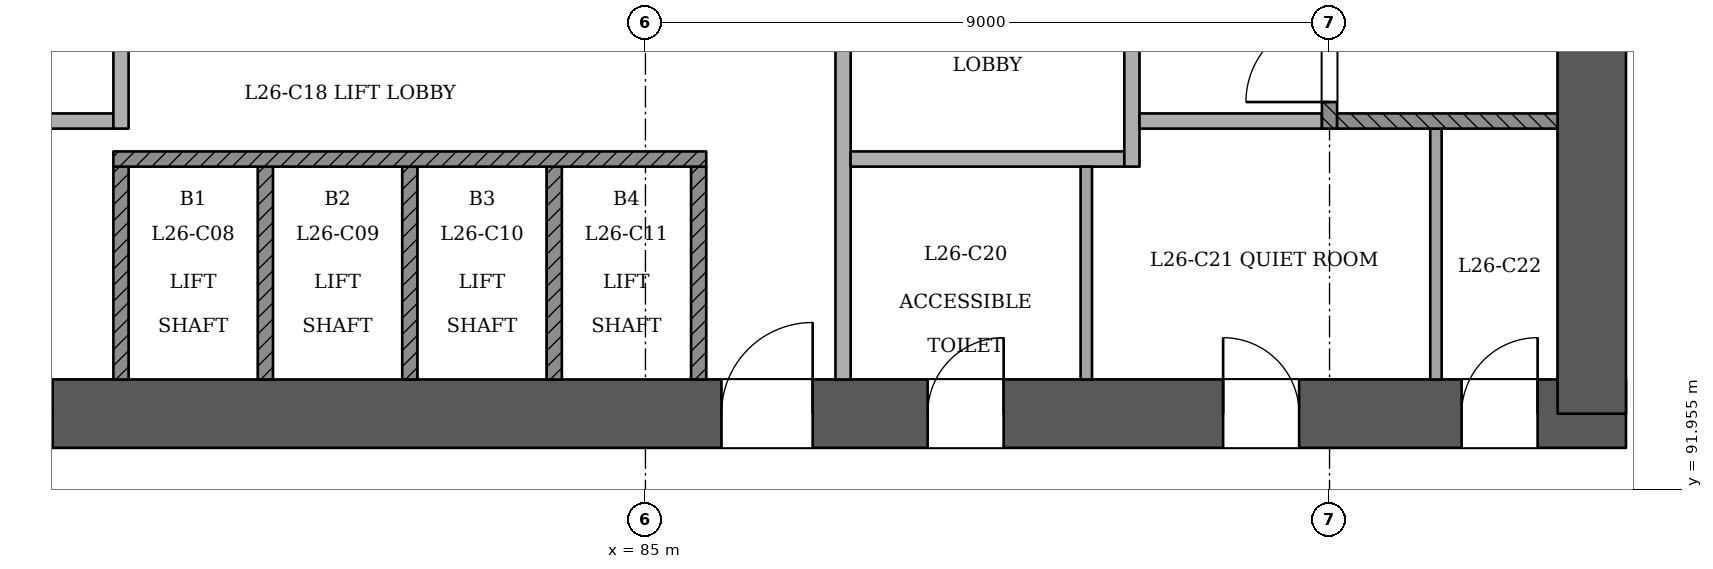
"""IFC4 building model, lengths in metres.
Left out: names, types, materials, properties, quantities, classifications, styles, units other than length and angle.
Written with IfcOpenShell. Run it as: python <this file> out.ifc"""

import sys

from ifc_helpers import new_model, si_unit, direction, frame, frame_2d, origin, place, context, subcontext, project, spatial, rectangle, extrude, element, fill, save


model = new_model("IFC4")
c1 = context("Model", 3, precision=1e-05, world=origin(), true_north=direction((0.0, 1.0)))
c2 = subcontext(c1, "Body", "Model", "MODEL_VIEW")
j1 = project(units=[si_unit("LENGTHUNIT", "METRE"), si_unit("PLANEANGLEUNIT", "RADIAN")], contexts=[c1])
p1 = place(None, origin())
s1 = spatial("IfcSite", under=j1, at=p1, CompositionType="ELEMENT")
p2 = place(p1, origin())
s2 = spatial("IfcBuilding", under=s1, at=p2, CompositionType="ELEMENT")
p3 = place(p2, frame((0.0, 0.0, 104.4)))
s3 = spatial("IfcBuildingStorey", under=s2, at=p3, CompositionType="ELEMENT", Elevation=104.4)
p4 = place(p3, frame((72.55, 92.95, 0.0), z_axis=(0.0, 0.0, 1.0), x_axis=(1.0, 0.0, 0.0)))
e1 = element("IfcWall", 1, at=p4, inside=s3, PredefinedType="SHEAR", context=c2, shape_type="SweptSolid", body=[
    extrude(rectangle(XDim=25.35, YDim=0.9, at=frame_2d((12.675, 0.0))), origin(), (0.0, 0.0, 1.0), 3.6),
])
p5 = place(p4, frame((1.25, 0.0, 0.0)))
e2 = element("IfcOpeningElement", 2, at=p5, cuts=e1, PredefinedType="OPENING", context=c2, shape_type="SweptSolid", body=[
    extrude(rectangle(XDim=1.2, YDim=2.1, at=frame_2d((0.6, 1.05))), frame((0.0, 0.46, 0.0), z_axis=(0.0, -1.0, 0.0), x_axis=(1.0, 0.0, 0.0)), (0.0, 0.0, 1.0), 0.921),
])
p6 = place(p4, frame((3.45, 0.0, 0.0)))
e3 = element("IfcOpeningElement", 3, at=p6, cuts=e1, PredefinedType="OPENING", context=c2, shape_type="SweptSolid", body=[
    extrude(rectangle(XDim=1.2, YDim=2.1, at=frame_2d((0.6, 1.05))), frame((0.0, 0.46, 0.0), z_axis=(0.0, -1.0, 0.0), x_axis=(1.0, 0.0, 0.0)), (0.0, 0.0, 1.0), 0.921),
])
p7 = place(p4, frame((13.45, 0.0, 0.0)))
e4 = element("IfcOpeningElement", 4, at=p7, cuts=e1, PredefinedType="OPENING", context=c2, shape_type="SweptSolid", body=[
    extrude(rectangle(XDim=1.2, YDim=2.1, at=frame_2d((0.6, 1.05))), frame((0.0, 0.46, 0.0), z_axis=(0.0, -1.0, 0.0), x_axis=(1.0, 0.0, 0.0)), (0.0, 0.0, 1.0), 0.921),
])
p8 = place(p4, frame((16.163, 0.0, 0.0)))
e5 = element("IfcOpeningElement", 5, at=p8, cuts=e1, PredefinedType="OPENING", context=c2, shape_type="SweptSolid", body=[
    extrude(rectangle(XDim=1.0, YDim=2.1, at=frame_2d((0.5, 1.05))), frame((0.0, 0.46, 0.0), z_axis=(0.0, -1.0, 0.0), x_axis=(1.0, 0.0, 0.0)), (0.0, 0.0, 1.0), 0.921),
])
p9 = place(p4, frame((20.05, 0.0, 0.0)))
e6 = element("IfcOpeningElement", 6, at=p9, cuts=e1, PredefinedType="OPENING", context=c2, shape_type="SweptSolid", body=[
    extrude(rectangle(XDim=1.0, YDim=2.1, at=frame_2d((0.5, 1.05))), frame((0.0, 0.46, 0.0), z_axis=(0.0, -1.0, 0.0), x_axis=(1.0, 0.0, 0.0)), (0.0, 0.0, 1.0), 0.921),
])
p10 = place(p4, frame((23.188, 0.0, 0.0)))
e7 = element("IfcOpeningElement", 7, at=p10, cuts=e1, PredefinedType="OPENING", context=c2, shape_type="SweptSolid", body=[
    extrude(rectangle(XDim=1.0, YDim=2.1, at=frame_2d((0.5, 1.05))), frame((0.0, 0.46, 0.0), z_axis=(0.0, -1.0, 0.0), x_axis=(1.0, 0.0, 0.0)), (0.0, 0.0, 1.0), 0.921),
])
p11 = place(p3, frame((97.45, 92.95, 0.0), z_axis=(0.0, 0.0, 1.0), x_axis=(0.0, 1.0, 0.0)))
e8 = element("IfcWall", 8, at=p11, inside=s3, PredefinedType="SHEAR", context=c2, shape_type="SweptSolid", body=[
    extrude(rectangle(XDim=11.35, YDim=0.9, at=frame_2d((5.675, 0.0))), origin(), (0.0, 0.0, 1.0), 3.6),
])
p12 = place(p3, frame((63.745, 97.773, 0.0), z_axis=(0.0, 0.0, 1.0), x_axis=(0.500001045382, -0.866024800232, 0.0)))
e9 = element("IfcWall", 9, at=p12, inside=s3, PredefinedType="PARTITIONING", context=c2, shape_type="SweptSolid", body=[
    extrude(rectangle(XDim=41.671, YDim=0.15, at=frame_2d((20.836, 0.0))), origin(), (0.0, 0.0, 1.0), 2.7),
])
p13 = place(p12, frame((2.868, 0.0, 0.0)))
e10 = element("IfcOpeningElement", 10, at=p13, cuts=e9, PredefinedType="OPENING", context=c2, shape_type="SweptSolid", body=[
    extrude(rectangle(XDim=1.2, YDim=2.1, at=frame_2d((0.6, 1.05))), frame((0.0, 0.085, 0.0), z_axis=(0.0, -1.0, 0.0), x_axis=(1.0, 0.0, 0.0)), (0.0, 0.0, 1.0), 0.171),
])
p14 = place(p12, frame((10.115, 0.0, 0.0)))
e11 = element("IfcOpeningElement", 11, at=p14, cuts=e9, PredefinedType="OPENING", context=c2, shape_type="SweptSolid", body=[
    extrude(rectangle(XDim=1.0, YDim=2.1, at=frame_2d((0.5, 1.05))), frame((0.0, 0.085, 0.0), z_axis=(0.0, -1.0, 0.0), x_axis=(1.0, 0.0, 0.0)), (0.0, 0.0, 1.0), 0.171),
])
p15 = place(p12, frame((12.44, 0.0, 0.0)))
e12 = element("IfcOpeningElement", 12, at=p15, cuts=e9, PredefinedType="OPENING", context=c2, shape_type="SweptSolid", body=[
    extrude(rectangle(XDim=1.0, YDim=2.1, at=frame_2d((0.5, 1.05))), frame((0.0, 0.085, 0.0), z_axis=(0.0, -1.0, 0.0), x_axis=(1.0, 0.0, 0.0)), (0.0, 0.0, 1.0), 0.171),
])
p16 = place(p12, frame((19.231, 0.0, 0.0)))
e13 = element("IfcOpeningElement", 13, at=p16, cuts=e9, PredefinedType="OPENING", context=c2, shape_type="SweptSolid", body=[
    extrude(rectangle(XDim=1.0, YDim=2.1, at=frame_2d((0.5, 1.05))), frame((0.0, 0.085, 0.0), z_axis=(0.0, -1.0, 0.0), x_axis=(1.0, 0.0, 0.0)), (0.0, 0.0, 1.0), 0.171),
])
p17 = place(p12, frame((21.556, 0.0, 0.0)))
e14 = element("IfcOpeningElement", 14, at=p17, cuts=e9, PredefinedType="OPENING", context=c2, shape_type="SweptSolid", body=[
    extrude(rectangle(XDim=1.0, YDim=2.1, at=frame_2d((0.5, 1.05))), frame((0.0, 0.085, 0.0), z_axis=(0.0, -1.0, 0.0), x_axis=(1.0, 0.0, 0.0)), (0.0, 0.0, 1.0), 0.171),
])
p18 = place(p12, frame((27.086, 0.0, 0.0)))
e15 = element("IfcOpeningElement", 15, at=p18, cuts=e9, PredefinedType="OPENING", context=c2, shape_type="SweptSolid", body=[
    extrude(rectangle(XDim=1.0, YDim=2.1, at=frame_2d((0.5, 1.05))), frame((0.0, 0.085, 0.0), z_axis=(0.0, -1.0, 0.0), x_axis=(1.0, 0.0, 0.0)), (0.0, 0.0, 1.0), 0.171),
])
p19 = place(p12, frame((30.44, 0.0, 0.0)))
e16 = element("IfcOpeningElement", 16, at=p19, cuts=e9, PredefinedType="OPENING", context=c2, shape_type="SweptSolid", body=[
    extrude(rectangle(XDim=1.0, YDim=2.1, at=frame_2d((0.5, 1.05))), frame((0.0, 0.085, 0.0), z_axis=(0.0, -1.0, 0.0), x_axis=(1.0, 0.0, 0.0)), (0.0, 0.0, 1.0), 0.171),
])
p20 = place(p12, frame((37.619, 0.0, 0.0)))
e17 = element("IfcOpeningElement", 17, at=p20, cuts=e9, PredefinedType="OPENING", context=c2, shape_type="SweptSolid", body=[
    extrude(rectangle(XDim=1.2, YDim=2.1, at=frame_2d((0.6, 1.05))), frame((0.0, 0.085, 0.0), z_axis=(0.0, -1.0, 0.0), x_axis=(1.0, 0.0, 0.0)), (0.0, 0.0, 1.0), 0.171),
])
p21 = place(p3, frame((85.42, 61.685, 0.0), z_axis=(0.0, 0.0, 1.0), x_axis=(0.500001045382, 0.866024800232, 0.0)))
e18 = element("IfcWall", 18, at=p21, inside=s3, PredefinedType="PARTITIONING", context=c2, shape_type="SweptSolid", body=[
    extrude(rectangle(XDim=41.671, YDim=0.15, at=frame_2d((20.836, 0.0))), origin(), (0.0, 0.0, 1.0), 2.7),
])
p22 = place(p21, frame((0.239, 0.0, 0.0)))
e19 = element("IfcOpeningElement", 19, at=p22, cuts=e18, PredefinedType="OPENING", context=c2, shape_type="SweptSolid", body=[
    extrude(rectangle(XDim=1.2, YDim=2.1, at=frame_2d((0.6, 1.05))), frame((0.0, 0.085, 0.0), z_axis=(0.0, -1.0, 0.0), x_axis=(1.0, 0.0, 0.0)), (0.0, 0.0, 1.0), 0.171),
])
p23 = place(p21, frame((5.636, 0.0, 0.0)))
e20 = element("IfcOpeningElement", 20, at=p23, cuts=e18, PredefinedType="OPENING", context=c2, shape_type="SweptSolid", body=[
    extrude(rectangle(XDim=1.2, YDim=2.1, at=frame_2d((0.6, 1.05))), frame((0.0, 0.085, 0.0), z_axis=(0.0, -1.0, 0.0), x_axis=(1.0, 0.0, 0.0)), (0.0, 0.0, 1.0), 0.171),
])
p24 = place(p21, frame((13.586, 0.0, 0.0)))
e21 = element("IfcOpeningElement", 21, at=p24, cuts=e18, PredefinedType="OPENING", context=c2, shape_type="SweptSolid", body=[
    extrude(rectangle(XDim=1.0, YDim=2.1, at=frame_2d((0.5, 1.05))), frame((0.0, 0.085, 0.0), z_axis=(0.0, -1.0, 0.0), x_axis=(1.0, 0.0, 0.0)), (0.0, 0.0, 1.0), 0.171),
])
p25 = place(p21, frame((18.086, 0.0, 0.0)))
e22 = element("IfcOpeningElement", 22, at=p25, cuts=e18, PredefinedType="OPENING", context=c2, shape_type="SweptSolid", body=[
    extrude(rectangle(XDim=1.0, YDim=2.1, at=frame_2d((0.5, 1.05))), frame((0.0, 0.085, 0.0), z_axis=(0.0, -1.0, 0.0), x_axis=(1.0, 0.0, 0.0)), (0.0, 0.0, 1.0), 0.171),
])
p26 = place(p21, frame((21.556, 0.0, 0.0)))
e23 = element("IfcOpeningElement", 23, at=p26, cuts=e18, PredefinedType="OPENING", context=c2, shape_type="SweptSolid", body=[
    extrude(rectangle(XDim=1.0, YDim=2.1, at=frame_2d((0.5, 1.05))), frame((0.0, 0.085, 0.0), z_axis=(0.0, -1.0, 0.0), x_axis=(1.0, 0.0, 0.0)), (0.0, 0.0, 1.0), 0.171),
])
p27 = place(p21, frame((27.086, 0.0, 0.0)))
e24 = element("IfcOpeningElement", 24, at=p27, cuts=e18, PredefinedType="OPENING", context=c2, shape_type="SweptSolid", body=[
    extrude(rectangle(XDim=1.0, YDim=2.1, at=frame_2d((0.5, 1.05))), frame((0.0, 0.085, 0.0), z_axis=(0.0, -1.0, 0.0), x_axis=(1.0, 0.0, 0.0)), (0.0, 0.0, 1.0), 0.171),
])
p28 = place(p21, frame((30.556, 0.0, 0.0)))
e25 = element("IfcOpeningElement", 25, at=p28, cuts=e18, PredefinedType="OPENING", context=c2, shape_type="SweptSolid", body=[
    extrude(rectangle(XDim=1.0, YDim=2.1, at=frame_2d((0.5, 1.05))), frame((0.0, 0.085, 0.0), z_axis=(0.0, -1.0, 0.0), x_axis=(1.0, 0.0, 0.0)), (0.0, 0.0, 1.0), 0.171),
])
p29 = place(p21, frame((37.604, 0.0, 0.0)))
e26 = element("IfcOpeningElement", 26, at=p29, cuts=e18, PredefinedType="OPENING", context=c2, shape_type="SweptSolid", body=[
    extrude(rectangle(XDim=1.2, YDim=2.1, at=frame_2d((0.6, 1.05))), frame((0.0, 0.085, 0.0), z_axis=(0.0, -1.0, 0.0), x_axis=(1.0, 0.0, 0.0)), (0.0, 0.0, 1.0), 0.171),
])
for number, where, z_axis, x_axis in (
    (27, (78.1, 93.4, 0.0), (0.0, 0.0, 1.0), (0.0, 1.0, 0.0)),
    (28, (80.0, 93.4, 0.0), (0.0, 0.0, 1.0), (0.0, 1.0, 0.0)),
    (29, (81.9, 93.4, 0.0), (0.0, 0.0, 1.0), (0.0, 1.0, 0.0)),
    (30, (83.8, 93.4, 0.0), (0.0, 0.0, 1.0), (0.0, 1.0, 0.0)),
    (31, (85.7, 93.4, 0.0), (0.0, 0.0, 1.0), (0.0, 1.0, 0.0)),
):
    element("IfcWall", number, at=place(p3, frame(where, z_axis=z_axis, x_axis=x_axis)), inside=s3, PredefinedType="SOLIDWALL", context=c2, shape_type="SweptSolid", body=[
        extrude(rectangle(XDim=2.8, YDim=0.2, at=frame_2d((1.4, 0.0))), origin(), (0.0, 0.0, 1.0), 3.1),
    ])
p30 = place(p3, frame((87.6, 93.4, 0.0), z_axis=(0.0, 0.0, 1.0), x_axis=(0.0, 1.0, 0.0)))
e32 = element("IfcWall", 32, at=p30, inside=s3, PredefinedType="PARTITIONING", context=c2, shape_type="SweptSolid", body=[
    extrude(rectangle(XDim=7.0, YDim=0.2, at=frame_2d((3.5, 0.0))), origin(), (0.0, 0.0, 1.0), 3.1),
])
p31 = place(p30, frame((4.45, 0.0, 0.0)))
e33 = element("IfcOpeningElement", 33, at=p31, cuts=e32, PredefinedType="OPENING", context=c2, shape_type="SweptSolid", body=[
    extrude(rectangle(XDim=1.1, YDim=2.1, at=frame_2d((0.55, 1.05))), frame((0.0, 0.11, 0.0), z_axis=(0.0, -1.0, 0.0), x_axis=(1.0, 0.0, 0.0)), (0.0, 0.0, 1.0), 0.221),
])
p32 = place(p3, frame((90.8, 93.4, 0.0), z_axis=(0.0, 0.0, 1.0), x_axis=(0.0, 1.0, 0.0)))
e34 = element("IfcWall", 34, at=p32, inside=s3, PredefinedType="PARTITIONING", context=c2, shape_type="SweptSolid", body=[
    extrude(rectangle(XDim=2.8, YDim=0.15, at=frame_2d((1.4, 0.0))), origin(), (0.0, 0.0, 1.0), 3.1),
])
p33 = place(p3, frame((95.4, 93.4, 0.0), z_axis=(0.0, 0.0, 1.0), x_axis=(0.0, 1.0, 0.0)))
e35 = element("IfcWall", 35, at=p33, inside=s3, PredefinedType="PARTITIONING", context=c2, shape_type="SweptSolid", body=[
    extrude(rectangle(XDim=3.3, YDim=0.15, at=frame_2d((1.65, 0.0))), origin(), (0.0, 0.0, 1.0), 3.1),
])
p34 = place(p3, frame((78.0, 96.3, 0.0), z_axis=(0.0, 0.0, 1.0), x_axis=(1.0, 0.0, 0.0)))
e36 = element("IfcWall", 36, at=p34, inside=s3, PredefinedType="SOLIDWALL", context=c2, shape_type="SweptSolid", body=[
    extrude(rectangle(XDim=7.8, YDim=0.2, at=frame_2d((3.9, 0.0))), origin(), (0.0, 0.0, 1.0), 3.1),
])
p35 = place(p3, frame((87.7, 96.3, 0.0), z_axis=(0.0, 0.0, 1.0), x_axis=(1.0, 0.0, 0.0)))
e37 = element("IfcWall", 37, at=p35, inside=s3, PredefinedType="PARTITIONING", context=c2, shape_type="SweptSolid", body=[
    extrude(rectangle(XDim=3.6, YDim=0.2, at=frame_2d((1.8, 0.0))), origin(), (0.0, 0.0, 1.0), 3.1),
])
p36 = place(p3, frame((91.4, 96.2, 0.0), z_axis=(0.0, 0.0, 1.0), x_axis=(0.0, 1.0, 0.0)))
e38 = element("IfcWall", 38, at=p36, inside=s3, PredefinedType="PARTITIONING", context=c2, shape_type="SweptSolid", body=[
    extrude(rectangle(XDim=4.2, YDim=0.2, at=frame_2d((2.1, 0.0))), origin(), (0.0, 0.0, 1.0), 3.1),
])
p37 = place(p36, frame((2.45, 0.0, 0.0)))
e39 = element("IfcOpeningElement", 39, at=p37, cuts=e38, PredefinedType="OPENING", context=c2, shape_type="SweptSolid", body=[
    extrude(rectangle(XDim=1.1, YDim=2.1, at=frame_2d((0.55, 1.05))), frame((0.0, 0.11, 0.0), z_axis=(0.0, -1.0, 0.0), x_axis=(1.0, 0.0, 0.0)), (0.0, 0.0, 1.0), 0.221),
])
p38 = place(p3, frame((76.1, 96.8, 0.0), z_axis=(0.0, 0.0, 1.0), x_axis=(1.0, 0.0, 0.0)))
e40 = element("IfcWall", 40, at=p38, inside=s3, PredefinedType="PARTITIONING", context=c2, shape_type="SweptSolid", body=[
    extrude(rectangle(XDim=1.9, YDim=0.2, at=frame_2d((0.95, 0.0))), origin(), (0.0, 0.0, 1.0), 3.1),
])
p39 = place(p3, frame((78.1, 96.7, 0.0), z_axis=(0.0, 0.0, 1.0), x_axis=(0.0, 1.0, 0.0)))
e41 = element("IfcWall", 41, at=p39, inside=s3, PredefinedType="PARTITIONING", context=c2, shape_type="SweptSolid", body=[
    extrude(rectangle(XDim=3.7, YDim=0.2, at=frame_2d((1.85, 0.0))), origin(), (0.0, 0.0, 1.0), 3.1),
])
p40 = place(p39, frame((1.95, 0.0, 0.0)))
e42 = element("IfcOpeningElement", 42, at=p40, cuts=e41, PredefinedType="OPENING", context=c2, shape_type="SweptSolid", body=[
    extrude(rectangle(XDim=1.1, YDim=2.1, at=frame_2d((0.55, 1.05))), frame((0.0, 0.11, 0.0), z_axis=(0.0, -1.0, 0.0), x_axis=(1.0, 0.0, 0.0)), (0.0, 0.0, 1.0), 0.221),
])
p41 = place(p3, frame((91.5, 96.8, 0.0), z_axis=(0.0, 0.0, 1.0), x_axis=(1.0, 0.0, 0.0)))
e43 = element("IfcWall", 43, at=p41, inside=s3, PredefinedType="PARTITIONING", context=c2, shape_type="SweptSolid", body=[
    extrude(rectangle(XDim=2.4, YDim=0.2, at=frame_2d((1.2, 0.0))), origin(), (0.0, 0.0, 1.0), 3.1),
])
p42 = place(p3, frame((94.0, 96.7, 0.0), z_axis=(0.0, 0.0, 1.0), x_axis=(0.0, 1.0, 0.0)))
e44 = element("IfcWall", 44, at=p42, inside=s3, PredefinedType="SOLIDWALL", context=c2, shape_type="SweptSolid", body=[
    extrude(rectangle(XDim=3.7, YDim=0.2, at=frame_2d((1.85, 0.0))), origin(), (0.0, 0.0, 1.0), 3.1),
])
p43 = place(p42, frame((0.35, 0.0, 0.0)))
e45 = element("IfcOpeningElement", 45, at=p43, cuts=e44, PredefinedType="OPENING", context=c2, shape_type="SweptSolid", body=[
    extrude(rectangle(XDim=1.1, YDim=2.1, at=frame_2d((0.55, 1.05))), frame((0.0, 0.11, 0.0), z_axis=(0.0, -1.0, 0.0), x_axis=(1.0, 0.0, 0.0)), (0.0, 0.0, 1.0), 0.221),
])
p44 = place(p3, frame((94.1, 96.8, 0.0), z_axis=(0.0, 0.0, 1.0), x_axis=(1.0, 0.0, 0.0)))
e46 = element("IfcWall", 46, at=p44, inside=s3, PredefinedType="SOLIDWALL", context=c2, shape_type="SweptSolid", body=[
    extrude(rectangle(XDim=2.9, YDim=0.2, at=frame_2d((1.45, 0.0))), origin(), (0.0, 0.0, 1.0), 3.1),
])
p45 = place(p43, origin())
e47 = element("IfcDoor", 47, at=p45, inside=s3, OperationType="SINGLE_SWING_LEFT", PredefinedType="NOTDEFINED", context=c2, shape_type="SweptSolid", body=[
    extrude(rectangle(XDim=1.1, YDim=2.1, at=frame_2d((0.55, 1.05))), frame((0.0, 0.025, 0.0), z_axis=(0.0, -1.0, 0.0), x_axis=(1.0, 0.0, 0.0)), (0.0, 0.0, 1.0), 0.05),
])
fill(e45, e47)
p46 = place(p6, origin())
e48 = element("IfcDoor", 48, at=p46, inside=s3, OperationType="SINGLE_SWING_LEFT", PredefinedType="NOTDEFINED", context=c2, shape_type="SweptSolid", body=[
    extrude(rectangle(XDim=1.2, YDim=2.1, at=frame_2d((0.6, 1.05))), frame((0.0, 0.025, 0.0), z_axis=(0.0, -1.0, 0.0), x_axis=(1.0, 0.0, 0.0)), (0.0, 0.0, 1.0), 0.05),
])
fill(e3, e48)
p47 = place(p7, origin())
e49 = element("IfcDoor", 49, at=p47, inside=s3, OperationType="SINGLE_SWING_RIGHT", PredefinedType="NOTDEFINED", context=c2, shape_type="SweptSolid", body=[
    extrude(rectangle(XDim=1.2, YDim=2.1, at=frame_2d((0.6, 1.05))), frame((0.0, 0.025, 0.0), z_axis=(0.0, -1.0, 0.0), x_axis=(1.0, 0.0, 0.0)), (0.0, 0.0, 1.0), 0.05),
])
fill(e4, e49)
p48 = place(p8, origin())
e50 = element("IfcDoor", 50, at=p48, inside=s3, OperationType="SINGLE_SWING_RIGHT", PredefinedType="NOTDEFINED", context=c2, shape_type="SweptSolid", body=[
    extrude(rectangle(XDim=1.0, YDim=2.1, at=frame_2d((0.5, 1.05))), frame((0.0, 0.025, 0.0), z_axis=(0.0, -1.0, 0.0), x_axis=(1.0, 0.0, 0.0)), (0.0, 0.0, 1.0), 0.05),
])
fill(e5, e50)
p49 = place(p9, origin())
e51 = element("IfcDoor", 51, at=p49, inside=s3, OperationType="SINGLE_SWING_LEFT", PredefinedType="NOTDEFINED", context=c2, shape_type="SweptSolid", body=[
    extrude(rectangle(XDim=1.0, YDim=2.1, at=frame_2d((0.5, 1.05))), frame((0.0, 0.025, 0.0), z_axis=(0.0, -1.0, 0.0), x_axis=(1.0, 0.0, 0.0)), (0.0, 0.0, 1.0), 0.05),
])
fill(e6, e51)
p50 = place(p10, origin())
e52 = element("IfcDoor", 52, at=p50, inside=s3, OperationType="SINGLE_SWING_RIGHT", PredefinedType="NOTDEFINED", context=c2, shape_type="SweptSolid", body=[
    extrude(rectangle(XDim=1.0, YDim=2.1, at=frame_2d((0.5, 1.05))), frame((0.0, 0.025, 0.0), z_axis=(0.0, -1.0, 0.0), x_axis=(1.0, 0.0, 0.0)), (0.0, 0.0, 1.0), 0.05),
])
fill(e7, e52)
save(model, sys.argv[1])
